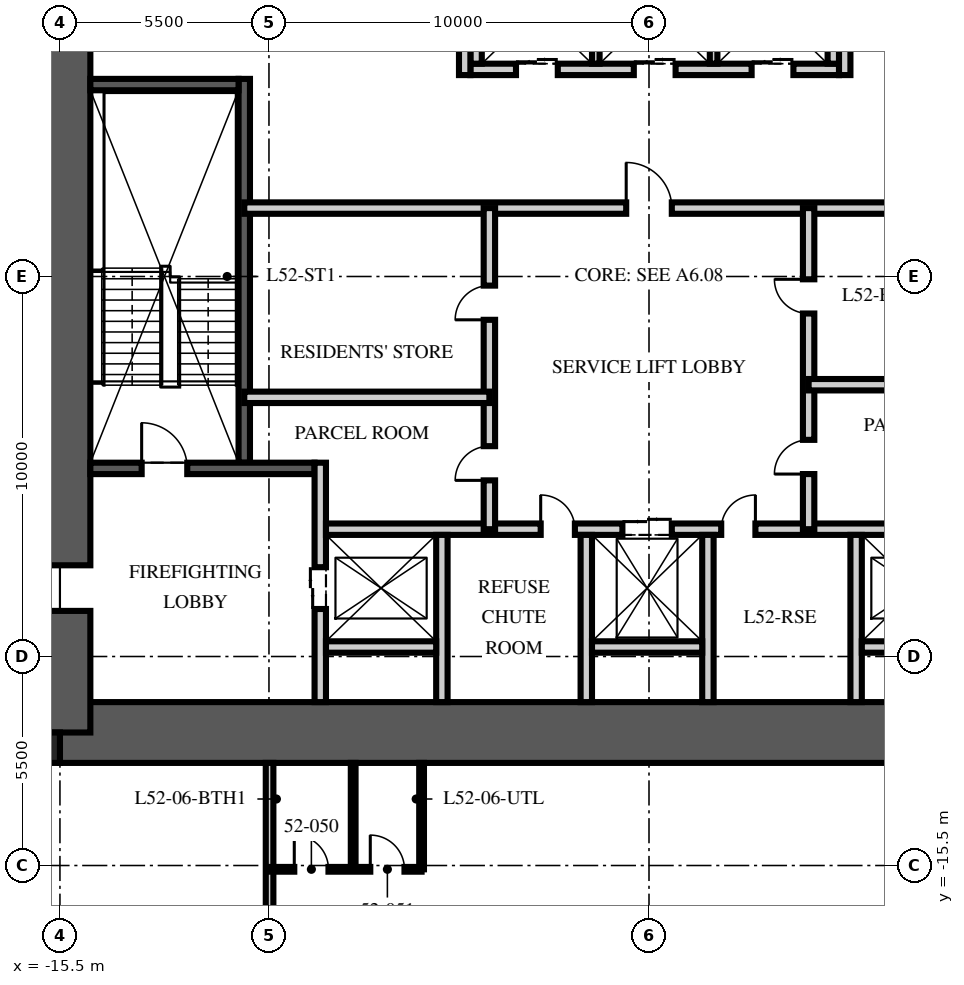
"""IFC4 building model, lengths in metres.
Left out: names, types, materials, properties, quantities, classifications, styles, units other than length and angle.
Written with IfcOpenShell. Run it as: python <this file> out.ifc"""

import sys

from ifc_helpers import new_model, si_unit, direction, frame, frame_2d, origin, origin_2d, place, context, subcontext, project, spatial, rectangle, extrude, element, fill, save


model = new_model("IFC4")
c1 = context("Model", 3, precision=1e-05, world=origin(), true_north=direction((0.0, 1.0)))
c2 = subcontext(c1, "Body", "Model", "MODEL_VIEW")
j1 = project(units=[si_unit("LENGTHUNIT", "METRE"), si_unit("PLANEANGLEUNIT", "RADIAN")], contexts=[c1])
p1 = place(None, origin())
s1 = spatial("IfcSite", under=j1, at=p1, CompositionType="ELEMENT")
p2 = place(p1, origin())
s2 = spatial("IfcBuilding", under=s1, at=p2, CompositionType="ELEMENT")
p3 = place(p2, frame((0.0, 0.0, 210.75)))
s3 = spatial("IfcBuildingStorey", under=s2, at=p3, CompositionType="ELEMENT", Elevation=210.75)
p4 = place(p3, frame((-15.5, -12.0, -0.25), z_axis=(0.0, 0.0, 1.0), x_axis=(1.0, 0.0, 0.0)))
e1 = element("IfcWall", 1, at=p4, inside=s3, PredefinedType="SHEAR", context=c2, shape_type="SweptSolid", body=[
    extrude(rectangle(XDim=31.0, YDim=1.6, at=frame_2d((15.5, 0.0))), origin(), (0.0, 0.0, 1.0), 3.75),
])
p5 = place(p3, frame((-15.5, -12.0, -0.25), z_axis=(0.0, 0.0, 1.0), x_axis=(0.0, 1.0, 0.0)))
e2 = element("IfcWall", 2, at=p5, inside=s3, PredefinedType="SHEAR", context=c2, shape_type="SweptSolid", body=[
    extrude(rectangle(XDim=24.0, YDim=1.6, at=frame_2d((12.0, 0.0))), origin(), (0.0, 0.0, 1.0), 3.75),
])
p6 = place(p5, frame((3.2, 0.0, 0.25)))
e3 = element("IfcOpeningElement", 3, at=p6, cuts=e2, PredefinedType="OPENING", context=c2, shape_type="SweptSolid", body=[
    extrude(rectangle(XDim=1.2, YDim=2.1, at=frame_2d((0.6, 1.05))), frame((0.0, 0.81, 0.0), z_axis=(0.0, -1.0, 0.0), x_axis=(1.0, 0.0, 0.0)), (0.0, 0.0, 1.0), 1.62),
])
p7 = place(p5, frame((19.3, 0.0, 0.25)))
e4 = element("IfcOpeningElement", 4, at=p7, cuts=e2, PredefinedType="OPENING", context=c2, shape_type="SweptSolid", body=[
    extrude(rectangle(XDim=1.8, YDim=2.1, at=frame_2d((0.9, 1.05))), frame((0.0, 0.81, 0.0), z_axis=(0.0, -1.0, 0.0), x_axis=(1.0, 0.0, 0.0)), (0.0, 0.0, 1.0), 1.62),
])
p8 = place(p3, frame((-15.9, -12.4, -0.25), z_axis=(0.0, 0.0, 1.0), x_axis=(1.0, 0.0, 0.0)))
e5 = element("IfcColumn", 5, at=p8, inside=s3, PredefinedType="COLUMN", context=c2, shape_type="SweptSolid", body=[
    extrude(rectangle(XDim=0.8, YDim=0.8, at=origin_2d()), origin(), (0.0, 0.0, 1.0), 3.75),
])
p9 = place(p3, frame((-10.65, -4.9, 0.0), z_axis=(0.0, 0.0, 1.0), x_axis=(0.0, 1.0, 0.0)))
e6 = element("IfcWall", 6, at=p9, inside=s3, PredefinedType="SOLIDWALL", context=c2, shape_type="SweptSolid", body=[
    extrude(rectangle(XDim=10.1, YDim=0.3, at=frame_2d((5.05, 0.0))), origin(), (0.0, 0.0, 1.0), 3.5),
])
p10 = place(p3, frame((-14.7, -5.05, 0.0), z_axis=(0.0, 0.0, 1.0), x_axis=(1.0, 0.0, 0.0)))
e7 = element("IfcWall", 7, at=p10, inside=s3, PredefinedType="SOLIDWALL", context=c2, shape_type="SweptSolid", body=[
    extrude(rectangle(XDim=5.9, YDim=0.3, at=frame_2d((2.95, 0.0))), origin(), (0.0, 0.0, 1.0), 3.5),
])
p11 = place(p10, frame((1.35, 0.0, 0.0)))
e8 = element("IfcOpeningElement", 8, at=p11, cuts=e7, PredefinedType="OPENING", context=c2, shape_type="SweptSolid", body=[
    extrude(rectangle(XDim=1.2, YDim=2.1, at=frame_2d((0.6, 1.05))), frame((0.0, 0.16, 0.0), z_axis=(0.0, -1.0, 0.0), x_axis=(1.0, 0.0, 0.0)), (0.0, 0.0, 1.0), 0.32),
])
p12 = place(p3, frame((-14.7, 5.05, 0.0), z_axis=(0.0, 0.0, 1.0), x_axis=(1.0, 0.0, 0.0)))
e9 = element("IfcWall", 9, at=p12, inside=s3, PredefinedType="SOLIDWALL", context=c2, shape_type="SweptSolid", body=[
    extrude(rectangle(XDim=3.9, YDim=0.3, at=frame_2d((1.95, 0.0))), origin(), (0.0, 0.0, 1.0), 3.5),
])
p13 = place(p3, frame((-8.65, -11.2, 0.0), z_axis=(0.0, 0.0, 1.0), x_axis=(0.0, 1.0, 0.0)))
e10 = element("IfcWall", 10, at=p13, inside=s3, PredefinedType="PARTITIONING", context=c2, shape_type="SweptSolid", body=[
    extrude(rectangle(XDim=6.3, YDim=0.3, at=frame_2d((3.15, 0.0))), origin(), (0.0, 0.0, 1.0), 3.5),
])
p14 = place(p13, frame((2.45, 0.0, 0.0)))
e11 = element("IfcOpeningElement", 11, at=p14, cuts=e10, PredefinedType="OPENING", context=c2, shape_type="SweptSolid", body=[
    extrude(rectangle(XDim=1.1, YDim=2.1, at=frame_2d((0.55, 1.05))), frame((0.0, 0.16, 0.0), z_axis=(0.0, -1.0, 0.0), x_axis=(1.0, 0.0, 0.0)), (0.0, 0.0, 1.0), 0.32),
])
p15 = place(p3, frame((-8.5, -6.65, 0.0), z_axis=(0.0, 0.0, 1.0), x_axis=(1.0, 0.0, 0.0)))
e12 = element("IfcWall", 12, at=p15, inside=s3, PredefinedType="PARTITIONING", context=c2, shape_type="SweptSolid", body=[
    extrude(rectangle(XDim=17.0, YDim=0.3, at=frame_2d((8.5, 0.0))), origin(), (0.0, 0.0, 1.0), 3.5),
])
p16 = place(p15, frame((7.8, 0.0, 0.0)))
e13 = element("IfcOpeningElement", 13, at=p16, cuts=e12, PredefinedType="OPENING", context=c2, shape_type="SweptSolid", body=[
    extrude(rectangle(XDim=1.3, YDim=2.4, at=frame_2d((0.65, 1.2))), frame((0.0, 0.16, 0.0), z_axis=(0.0, -1.0, 0.0), x_axis=(1.0, 0.0, 0.0)), (0.0, 0.0, 1.0), 0.32),
])
p17 = place(p15, frame((5.65, 0.0, 0.0)))
e14 = element("IfcOpeningElement", 14, at=p17, cuts=e12, PredefinedType="OPENING", context=c2, shape_type="SweptSolid", body=[
    extrude(rectangle(XDim=0.9, YDim=2.1, at=frame_2d((0.45, 1.05))), frame((0.0, 0.16, 0.0), z_axis=(0.0, -1.0, 0.0), x_axis=(1.0, 0.0, 0.0)), (0.0, 0.0, 1.0), 0.32),
])
p18 = place(p15, frame((10.4, 0.0, 0.0)))
e15 = element("IfcOpeningElement", 15, at=p18, cuts=e12, PredefinedType="OPENING", context=c2, shape_type="SweptSolid", body=[
    extrude(rectangle(XDim=0.9, YDim=2.1, at=frame_2d((0.45, 1.05))), frame((0.0, 0.16, 0.0), z_axis=(0.0, -1.0, 0.0), x_axis=(1.0, 0.0, 0.0)), (0.0, 0.0, 1.0), 0.32),
])
for number, where, z_axis, x_axis in (
    (16, (-5.45, -11.2, 0.0), (0.0, 0.0, 1.0), (0.0, 1.0, 0.0)),
    (17, (-1.65, -11.2, 0.0), (0.0, 0.0, 1.0), (0.0, 1.0, 0.0)),
    (18, (1.55, -11.2, 0.0), (0.0, 0.0, 1.0), (0.0, 1.0, 0.0)),
    (19, (5.45, -11.2, 0.0), (0.0, 0.0, 1.0), (0.0, 1.0, 0.0)),
):
    element("IfcWall", number, at=place(p3, frame(where, z_axis=z_axis, x_axis=x_axis)), inside=s3, PredefinedType="PARTITIONING", context=c2, shape_type="SweptSolid", body=[
        extrude(rectangle(XDim=4.4, YDim=0.3, at=frame_2d((2.2, 0.0))), origin(), (0.0, 0.0, 1.0), 3.5),
    ])
for number, where, z_axis, x_axis in (
    (20, (-8.5, -9.75, 0.0), (0.0, 0.0, 1.0), (1.0, 0.0, 0.0)),
    (21, (-1.5, -9.75, 0.0), (0.0, 0.0, 1.0), (1.0, 0.0, 0.0)),
    (22, (5.6, -9.75, 0.0), (0.0, 0.0, 1.0), (1.0, 0.0, 0.0)),
):
    element("IfcWall", number, at=place(p3, frame(where, z_axis=z_axis, x_axis=x_axis)), inside=s3, PredefinedType="PARTITIONING", context=c2, shape_type="SweptSolid", body=[
        extrude(rectangle(XDim=2.9, YDim=0.3, at=frame_2d((1.45, 0.0))), origin(), (0.0, 0.0, 1.0), 3.5),
    ])
p19 = place(p3, frame((-4.7, 5.45, 0.0), z_axis=(0.0, 0.0, 1.0), x_axis=(1.0, 0.0, 0.0)))
e23 = element("IfcWall", 23, at=p19, inside=s3, PredefinedType="PARTITIONING", context=c2, shape_type="SweptSolid", body=[
    extrude(rectangle(XDim=9.7, YDim=0.3, at=frame_2d((4.85, 0.0))), origin(), (0.0, 0.0, 1.0), 3.5),
])
p20 = place(p19, frame((1.2, 0.0, 0.0)))
e24 = element("IfcOpeningElement", 24, at=p20, cuts=e23, PredefinedType="OPENING", context=c2, shape_type="SweptSolid", body=[
    extrude(rectangle(XDim=1.1, YDim=2.1, at=frame_2d((0.55, 1.05))), frame((0.0, 0.16, 0.0), z_axis=(0.0, -1.0, 0.0), x_axis=(1.0, 0.0, 0.0)), (0.0, 0.0, 1.0), 0.32),
])
p21 = place(p19, frame((4.3, 0.0, 0.0)))
e25 = element("IfcOpeningElement", 25, at=p21, cuts=e23, PredefinedType="OPENING", context=c2, shape_type="SweptSolid", body=[
    extrude(rectangle(XDim=1.1, YDim=2.1, at=frame_2d((0.55, 1.05))), frame((0.0, 0.16, 0.0), z_axis=(0.0, -1.0, 0.0), x_axis=(1.0, 0.0, 0.0)), (0.0, 0.0, 1.0), 0.32),
])
p22 = place(p19, frame((7.4, 0.0, 0.0)))
e26 = element("IfcOpeningElement", 26, at=p22, cuts=e23, PredefinedType="OPENING", context=c2, shape_type="SweptSolid", body=[
    extrude(rectangle(XDim=1.1, YDim=2.1, at=frame_2d((0.55, 1.05))), frame((0.0, 0.16, 0.0), z_axis=(0.0, -1.0, 0.0), x_axis=(1.0, 0.0, 0.0)), (0.0, 0.0, 1.0), 0.32),
])
for number, where, z_axis, x_axis in (
    (27, (-4.55, 5.6, 0.0), (0.0, 0.0, 1.0), (0.0, 1.0, 0.0)),
    (28, (4.85, 5.6, 0.0), (0.0, 0.0, 1.0), (0.0, 1.0, 0.0)),
):
    element("IfcWall", number, at=place(p3, frame(where, z_axis=z_axis, x_axis=x_axis)), inside=s3, PredefinedType="PARTITIONING", context=c2, shape_type="SweptSolid", body=[
        extrude(rectangle(XDim=2.8, YDim=0.3, at=frame_2d((1.4, 0.0))), origin(), (0.0, 0.0, 1.0), 3.5),
    ])
for number, where, z_axis, x_axis in (
    (29, (-1.4, 5.6, 0.0), (0.0, 0.0, 1.0), (0.0, 1.0, 0.0)),
    (30, (1.7, 5.6, 0.0), (0.0, 0.0, 1.0), (0.0, 1.0, 0.0)),
):
    element("IfcWall", number, at=place(p3, frame(where, z_axis=z_axis, x_axis=x_axis)), inside=s3, PredefinedType="PARTITIONING", context=c2, shape_type="SweptSolid", body=[
        extrude(rectangle(XDim=2.8, YDim=0.2, at=frame_2d((1.4, 0.0))), origin(), (0.0, 0.0, 1.0), 3.5),
    ])
p23 = place(p3, frame((-10.65, 1.8, 0.0), z_axis=(0.0, 0.0, 1.0), x_axis=(1.0, 0.0, 0.0)))
e31 = element("IfcWall", 31, at=p23, inside=s3, PredefinedType="PARTITIONING", context=c2, shape_type="SweptSolid", body=[
    extrude(rectangle(XDim=21.3, YDim=0.3, at=frame_2d((10.65, 0.0))), origin(), (0.0, 0.0, 1.0), 3.5),
])
p24 = place(p23, frame((10.05, 0.0, 0.0)))
e32 = element("IfcOpeningElement", 32, at=p24, cuts=e31, PredefinedType="OPENING", context=c2, shape_type="SweptSolid", body=[
    extrude(rectangle(XDim=1.2, YDim=2.1, at=frame_2d((0.6, 1.05))), frame((0.0, 0.16, 0.0), z_axis=(0.0, -1.0, 0.0), x_axis=(1.0, 0.0, 0.0)), (0.0, 0.0, 1.0), 0.32),
])
p25 = place(p23, frame((19.238, 0.0, 0.0)))
e33 = element("IfcOpeningElement", 33, at=p25, cuts=e31, PredefinedType="OPENING", context=c2, shape_type="SweptSolid", body=[
    extrude(rectangle(XDim=0.9, YDim=2.1, at=frame_2d((0.45, 1.05))), frame((0.0, 0.16, 0.0), z_axis=(0.0, -1.0, 0.0), x_axis=(1.0, 0.0, 0.0)), (0.0, 0.0, 1.0), 0.32),
])
p26 = place(p3, frame((-4.2, -6.65, 0.0), z_axis=(0.0, 0.0, 1.0), x_axis=(0.0, 1.0, 0.0)))
e34 = element("IfcWall", 34, at=p26, inside=s3, PredefinedType="PARTITIONING", context=c2, shape_type="SweptSolid", body=[
    extrude(rectangle(XDim=8.45, YDim=0.3, at=frame_2d((4.225, 0.0))), origin(), (0.0, 0.0, 1.0), 3.5),
])
p27 = place(p26, frame((1.285, 0.0, 0.0)))
e35 = element("IfcOpeningElement", 35, at=p27, cuts=e34, PredefinedType="OPENING", context=c2, shape_type="SweptSolid", body=[
    extrude(rectangle(XDim=0.9, YDim=2.1, at=frame_2d((0.45, 1.05))), frame((0.0, 0.16, 0.0), z_axis=(0.0, -1.0, 0.0), x_axis=(1.0, 0.0, 0.0)), (0.0, 0.0, 1.0), 0.32),
])
p28 = place(p26, frame((5.51, 0.0, 0.0)))
e36 = element("IfcOpeningElement", 36, at=p28, cuts=e34, PredefinedType="OPENING", context=c2, shape_type="SweptSolid", body=[
    extrude(rectangle(XDim=0.9, YDim=2.1, at=frame_2d((0.45, 1.05))), frame((0.0, 0.16, 0.0), z_axis=(0.0, -1.0, 0.0), x_axis=(1.0, 0.0, 0.0)), (0.0, 0.0, 1.0), 0.32),
])
p29 = place(p3, frame((4.2, -6.65, 0.0), z_axis=(0.0, 0.0, 1.0), x_axis=(0.0, 1.0, 0.0)))
e37 = element("IfcWall", 37, at=p29, inside=s3, PredefinedType="PARTITIONING", context=c2, shape_type="SweptSolid", body=[
    extrude(rectangle(XDim=8.45, YDim=0.3, at=frame_2d((4.225, 0.0))), origin(), (0.0, 0.0, 1.0), 3.5),
])
p30 = place(p29, frame((1.451, 0.0, 0.0)))
e38 = element("IfcOpeningElement", 38, at=p30, cuts=e37, PredefinedType="OPENING", context=c2, shape_type="SweptSolid", body=[
    extrude(rectangle(XDim=0.9, YDim=2.1, at=frame_2d((0.45, 1.05))), frame((0.0, 0.16, 0.0), z_axis=(0.0, -1.0, 0.0), x_axis=(1.0, 0.0, 0.0)), (0.0, 0.0, 1.0), 0.32),
])
p31 = place(p29, frame((5.676, 0.0, 0.0)))
e39 = element("IfcOpeningElement", 39, at=p31, cuts=e37, PredefinedType="OPENING", context=c2, shape_type="SweptSolid", body=[
    extrude(rectangle(XDim=0.9, YDim=2.1, at=frame_2d((0.45, 1.05))), frame((0.0, 0.16, 0.0), z_axis=(0.0, -1.0, 0.0), x_axis=(1.0, 0.0, 0.0)), (0.0, 0.0, 1.0), 0.32),
])
for number, where, z_axis, x_axis in (
    (40, (-10.65, -3.18, 0.0), (0.0, 0.0, 1.0), (1.0, 0.0, 0.0)),
    (41, (10.65, -2.848, 0.0), (0.0, 0.0, 1.0), (-1.0, 0.0, 0.0)),
):
    element("IfcWall", number, at=place(p3, frame(where, z_axis=z_axis, x_axis=x_axis)), inside=s3, PredefinedType="PARTITIONING", context=c2, shape_type="SweptSolid", body=[
        extrude(rectangle(XDim=6.45, YDim=0.3, at=frame_2d((3.225, 0.0))), origin(), (0.0, 0.0, 1.0), 3.5),
    ])
p32 = place(p3, frame((-4.85, 5.3, 0.0), z_axis=(0.0, 0.0, 1.0), x_axis=(0.0, 1.0, 0.0)))
e42 = element("IfcWall", 42, at=p32, inside=s3, PredefinedType="PARTITIONING", context=c2, shape_type="SweptSolid", body=[
    extrude(rectangle(XDim=5.9, YDim=0.3, at=frame_2d((2.95, 0.0))), origin(), (0.0, 0.0, 1.0), 3.5),
])
p33 = place(p32, frame((4.15, 0.0, 0.0)))
e43 = element("IfcOpeningElement", 43, at=p33, cuts=e42, PredefinedType="OPENING", context=c2, shape_type="SweptSolid", body=[
    extrude(rectangle(XDim=0.9, YDim=2.1, at=frame_2d((0.45, 1.05))), frame((0.0, 0.16, 0.0), z_axis=(0.0, -1.0, 0.0), x_axis=(1.0, 0.0, 0.0)), (0.0, 0.0, 1.0), 0.32),
])
p34 = place(p3, frame((5.15, 5.3, 0.0), z_axis=(0.0, 0.0, 1.0), x_axis=(0.0, 1.0, 0.0)))
e44 = element("IfcWall", 44, at=p34, inside=s3, PredefinedType="PARTITIONING", context=c2, shape_type="SweptSolid", body=[
    extrude(rectangle(XDim=5.9, YDim=0.3, at=frame_2d((2.95, 0.0))), origin(), (0.0, 0.0, 1.0), 3.5),
])
p35 = place(p34, frame((4.15, 0.0, 0.0)))
e45 = element("IfcOpeningElement", 45, at=p35, cuts=e44, PredefinedType="OPENING", context=c2, shape_type="SweptSolid", body=[
    extrude(rectangle(XDim=0.9, YDim=2.1, at=frame_2d((0.45, 1.05))), frame((0.0, 0.16, 0.0), z_axis=(0.0, -1.0, 0.0), x_axis=(1.0, 0.0, 0.0)), (0.0, 0.0, 1.0), 0.32),
])
p36 = place(p3, frame((-9.984, -12.8, 0.0), z_axis=(0.0, 0.0, 1.0), x_axis=(0.0, -1.0, 0.0)))
e46 = element("IfcWall", 46, at=p36, inside=s3, PredefinedType="PARTITIONING", context=c2, shape_type="SweptSolid", body=[
    extrude(rectangle(XDim=13.65, YDim=0.2, at=frame_2d((6.825, 0.0))), origin(), (0.0, 0.0, 1.0), 2.91),
])
p37 = place(p3, frame((-9.984, -15.6, 0.0), z_axis=(0.0, 0.0, 1.0), x_axis=(1.0, 0.0, 0.0)))
e47 = element("IfcWall", 47, at=p37, inside=s3, PredefinedType="PARTITIONING", context=c2, shape_type="SweptSolid", body=[
    extrude(rectangle(XDim=4.0, YDim=0.125, at=frame_2d((2.0, 0.0))), origin(), (0.0, 0.0, 1.0), 2.6),
])
p38 = place(p37, frame((0.65, 0.0, 0.0)))
e48 = element("IfcOpeningElement", 48, at=p38, cuts=e47, PredefinedType="OPENING", context=c2, shape_type="SweptSolid", body=[
    extrude(rectangle(XDim=0.9, YDim=2.1, at=frame_2d((0.45, 1.05))), frame((0.0, 0.073, 0.0), z_axis=(0.0, -1.0, 0.0), x_axis=(1.0, 0.0, 0.0)), (0.0, 0.0, 1.0), 0.145),
])
p39 = place(p37, frame((2.65, 0.0, 0.0)))
e49 = element("IfcOpeningElement", 49, at=p39, cuts=e47, PredefinedType="OPENING", context=c2, shape_type="SweptSolid", body=[
    extrude(rectangle(XDim=0.9, YDim=2.1, at=frame_2d((0.45, 1.05))), frame((0.0, 0.073, 0.0), z_axis=(0.0, -1.0, 0.0), x_axis=(1.0, 0.0, 0.0)), (0.0, 0.0, 1.0), 0.145),
])
for number, where, z_axis, x_axis in (
    (50, (-7.784, -12.8, 0.0), (0.0, 0.0, 1.0), (0.0, -1.0, 0.0)),
    (51, (-5.984, -12.8, 0.0), (0.0, 0.0, 1.0), (0.0, -1.0, 0.0)),
):
    element("IfcWall", number, at=place(p3, frame(where, z_axis=z_axis, x_axis=x_axis)), inside=s3, PredefinedType="PARTITIONING", context=c2, shape_type="SweptSolid", body=[
        extrude(rectangle(XDim=2.8, YDim=0.125, at=frame_2d((1.4, 0.0))), origin(), (0.0, 0.0, 1.0), 3.5),
    ])
p40 = place(p11, origin())
e52 = element("IfcDoor", 52, at=p40, inside=s3, OperationType="SINGLE_SWING_LEFT", PredefinedType="DOOR", context=c2, shape_type="SweptSolid", body=[
    extrude(rectangle(XDim=1.2, YDim=2.1, at=frame_2d((0.6, 1.05))), frame((0.0, 0.025, 0.0), z_axis=(0.0, -1.0, 0.0), x_axis=(1.0, 0.0, 0.0)), (0.0, 0.0, 1.0), 0.05),
])
fill(e8, e52)
p41 = place(p6, origin())
e53 = element("IfcDoor", 53, at=p41, inside=s3, OperationType="SINGLE_SWING_LEFT", PredefinedType="DOOR", context=c2, shape_type="SweptSolid", body=[
    extrude(rectangle(XDim=1.2, YDim=2.1, at=frame_2d((0.6, 1.05))), frame((0.0, 0.025, 0.0), z_axis=(0.0, -1.0, 0.0), x_axis=(1.0, 0.0, 0.0)), (0.0, 0.0, 1.0), 0.05),
])
fill(e3, e53)
p42 = place(p14, origin())
e54 = element("IfcDoor", 54, at=p42, inside=s3, OperationType="DOUBLE_DOOR_SLIDING", PredefinedType="DOOR", context=c2, shape_type="SweptSolid", body=[
    extrude(rectangle(XDim=1.1, YDim=2.1, at=frame_2d((0.55, 1.05))), frame((0.0, 0.025, 0.0), z_axis=(0.0, -1.0, 0.0), x_axis=(1.0, 0.0, 0.0)), (0.0, 0.0, 1.0), 0.05),
])
fill(e11, e54)
p43 = place(p20, origin())
e55 = element("IfcDoor", 55, at=p43, inside=s3, OperationType="DOUBLE_DOOR_SLIDING", PredefinedType="DOOR", context=c2, shape_type="SweptSolid", body=[
    extrude(rectangle(XDim=1.1, YDim=2.1, at=frame_2d((0.55, 1.05))), frame((0.0, 0.025, 0.0), z_axis=(0.0, -1.0, 0.0), x_axis=(1.0, 0.0, 0.0)), (0.0, 0.0, 1.0), 0.05),
])
fill(e24, e55)
p44 = place(p21, origin())
e56 = element("IfcDoor", 56, at=p44, inside=s3, OperationType="DOUBLE_DOOR_SLIDING", PredefinedType="DOOR", context=c2, shape_type="SweptSolid", body=[
    extrude(rectangle(XDim=1.1, YDim=2.1, at=frame_2d((0.55, 1.05))), frame((0.0, 0.025, 0.0), z_axis=(0.0, -1.0, 0.0), x_axis=(1.0, 0.0, 0.0)), (0.0, 0.0, 1.0), 0.05),
])
fill(e25, e56)
p45 = place(p22, origin())
e57 = element("IfcDoor", 57, at=p45, inside=s3, OperationType="DOUBLE_DOOR_SLIDING", PredefinedType="DOOR", context=c2, shape_type="SweptSolid", body=[
    extrude(rectangle(XDim=1.1, YDim=2.1, at=frame_2d((0.55, 1.05))), frame((0.0, 0.025, 0.0), z_axis=(0.0, -1.0, 0.0), x_axis=(1.0, 0.0, 0.0)), (0.0, 0.0, 1.0), 0.05),
])
fill(e26, e57)
p46 = place(p16, origin())
e58 = element("IfcDoor", 58, at=p46, inside=s3, OperationType="DOUBLE_DOOR_SLIDING", PredefinedType="DOOR", context=c2, shape_type="SweptSolid", body=[
    extrude(rectangle(XDim=1.3, YDim=2.4, at=frame_2d((0.65, 1.2))), frame((0.0, 0.025, 0.0), z_axis=(0.0, -1.0, 0.0), x_axis=(1.0, 0.0, 0.0)), (0.0, 0.0, 1.0), 0.05),
])
fill(e13, e58)
p47 = place(p24, origin())
e59 = element("IfcDoor", 59, at=p47, inside=s3, OperationType="SINGLE_SWING_LEFT", PredefinedType="DOOR", context=c2, shape_type="SweptSolid", body=[
    extrude(rectangle(XDim=1.2, YDim=2.1, at=frame_2d((0.6, 1.05))), frame((0.0, 0.025, 0.0), z_axis=(0.0, -1.0, 0.0), x_axis=(1.0, 0.0, 0.0)), (0.0, 0.0, 1.0), 0.05),
])
fill(e32, e59)
p48 = place(p17, origin())
e60 = element("IfcDoor", 60, at=p48, inside=s3, OperationType="SINGLE_SWING_LEFT", PredefinedType="DOOR", context=c2, shape_type="SweptSolid", body=[
    extrude(rectangle(XDim=0.9, YDim=2.1, at=frame_2d((0.45, 1.05))), frame((0.0, 0.025, 0.0), z_axis=(0.0, -1.0, 0.0), x_axis=(1.0, 0.0, 0.0)), (0.0, 0.0, 1.0), 0.05),
])
fill(e14, e60)
p49 = place(p18, origin())
e61 = element("IfcDoor", 61, at=p49, inside=s3, OperationType="SINGLE_SWING_RIGHT", PredefinedType="DOOR", context=c2, shape_type="SweptSolid", body=[
    extrude(rectangle(XDim=0.9, YDim=2.1, at=frame_2d((0.45, 1.05))), frame((0.0, 0.025, 0.0), z_axis=(0.0, -1.0, 0.0), x_axis=(1.0, 0.0, 0.0)), (0.0, 0.0, 1.0), 0.05),
])
fill(e15, e61)
p50 = place(p27, origin())
e62 = element("IfcDoor", 62, at=p50, inside=s3, OperationType="SINGLE_SWING_LEFT", PredefinedType="DOOR", context=c2, shape_type="SweptSolid", body=[
    extrude(rectangle(XDim=0.9, YDim=2.1, at=frame_2d((0.45, 1.05))), frame((0.0, 0.025, 0.0), z_axis=(0.0, -1.0, 0.0), x_axis=(1.0, 0.0, 0.0)), (0.0, 0.0, 1.0), 0.05),
])
fill(e35, e62)
p51 = place(p28, origin())
e63 = element("IfcDoor", 63, at=p51, inside=s3, OperationType="SINGLE_SWING_LEFT", PredefinedType="DOOR", context=c2, shape_type="SweptSolid", body=[
    extrude(rectangle(XDim=0.9, YDim=2.1, at=frame_2d((0.45, 1.05))), frame((0.0, 0.025, 0.0), z_axis=(0.0, -1.0, 0.0), x_axis=(1.0, 0.0, 0.0)), (0.0, 0.0, 1.0), 0.05),
])
fill(e36, e63)
p52 = place(p30, origin())
e64 = element("IfcDoor", 64, at=p52, inside=s3, OperationType="SINGLE_SWING_LEFT", PredefinedType="DOOR", context=c2, shape_type="SweptSolid", body=[
    extrude(rectangle(XDim=0.9, YDim=2.1, at=frame_2d((0.45, 1.05))), frame((0.0, 0.025, 0.0), z_axis=(0.0, -1.0, 0.0), x_axis=(1.0, 0.0, 0.0)), (0.0, 0.0, 1.0), 0.05),
])
fill(e38, e64)
p53 = place(p31, origin())
e65 = element("IfcDoor", 65, at=p53, inside=s3, OperationType="SINGLE_SWING_RIGHT", PredefinedType="DOOR", context=c2, shape_type="SweptSolid", body=[
    extrude(rectangle(XDim=0.9, YDim=2.1, at=frame_2d((0.45, 1.05))), frame((0.0, 0.025, 0.0), z_axis=(0.0, -1.0, 0.0), x_axis=(1.0, 0.0, 0.0)), (0.0, 0.0, 1.0), 0.05),
])
fill(e39, e65)
p54 = place(p38, origin())
e66 = element("IfcDoor", 66, at=p54, inside=s3, OperationType="SINGLE_SWING_LEFT", PredefinedType="DOOR", context=c2, shape_type="SweptSolid", body=[
    extrude(rectangle(XDim=0.9, YDim=2.1, at=frame_2d((0.45, 1.05))), frame((0.0, 0.025, 0.0), z_axis=(0.0, -1.0, 0.0), x_axis=(1.0, 0.0, 0.0)), (0.0, 0.0, 1.0), 0.05),
])
fill(e48, e66)
p55 = place(p39, origin())
e67 = element("IfcDoor", 67, at=p55, inside=s3, OperationType="SINGLE_SWING_LEFT", PredefinedType="DOOR", context=c2, shape_type="SweptSolid", body=[
    extrude(rectangle(XDim=0.9, YDim=2.1, at=frame_2d((0.45, 1.05))), frame((0.0, 0.025, 0.0), z_axis=(0.0, -1.0, 0.0), x_axis=(1.0, 0.0, 0.0)), (0.0, 0.0, 1.0), 0.05),
])
fill(e49, e67)
save(model, sys.argv[1])
